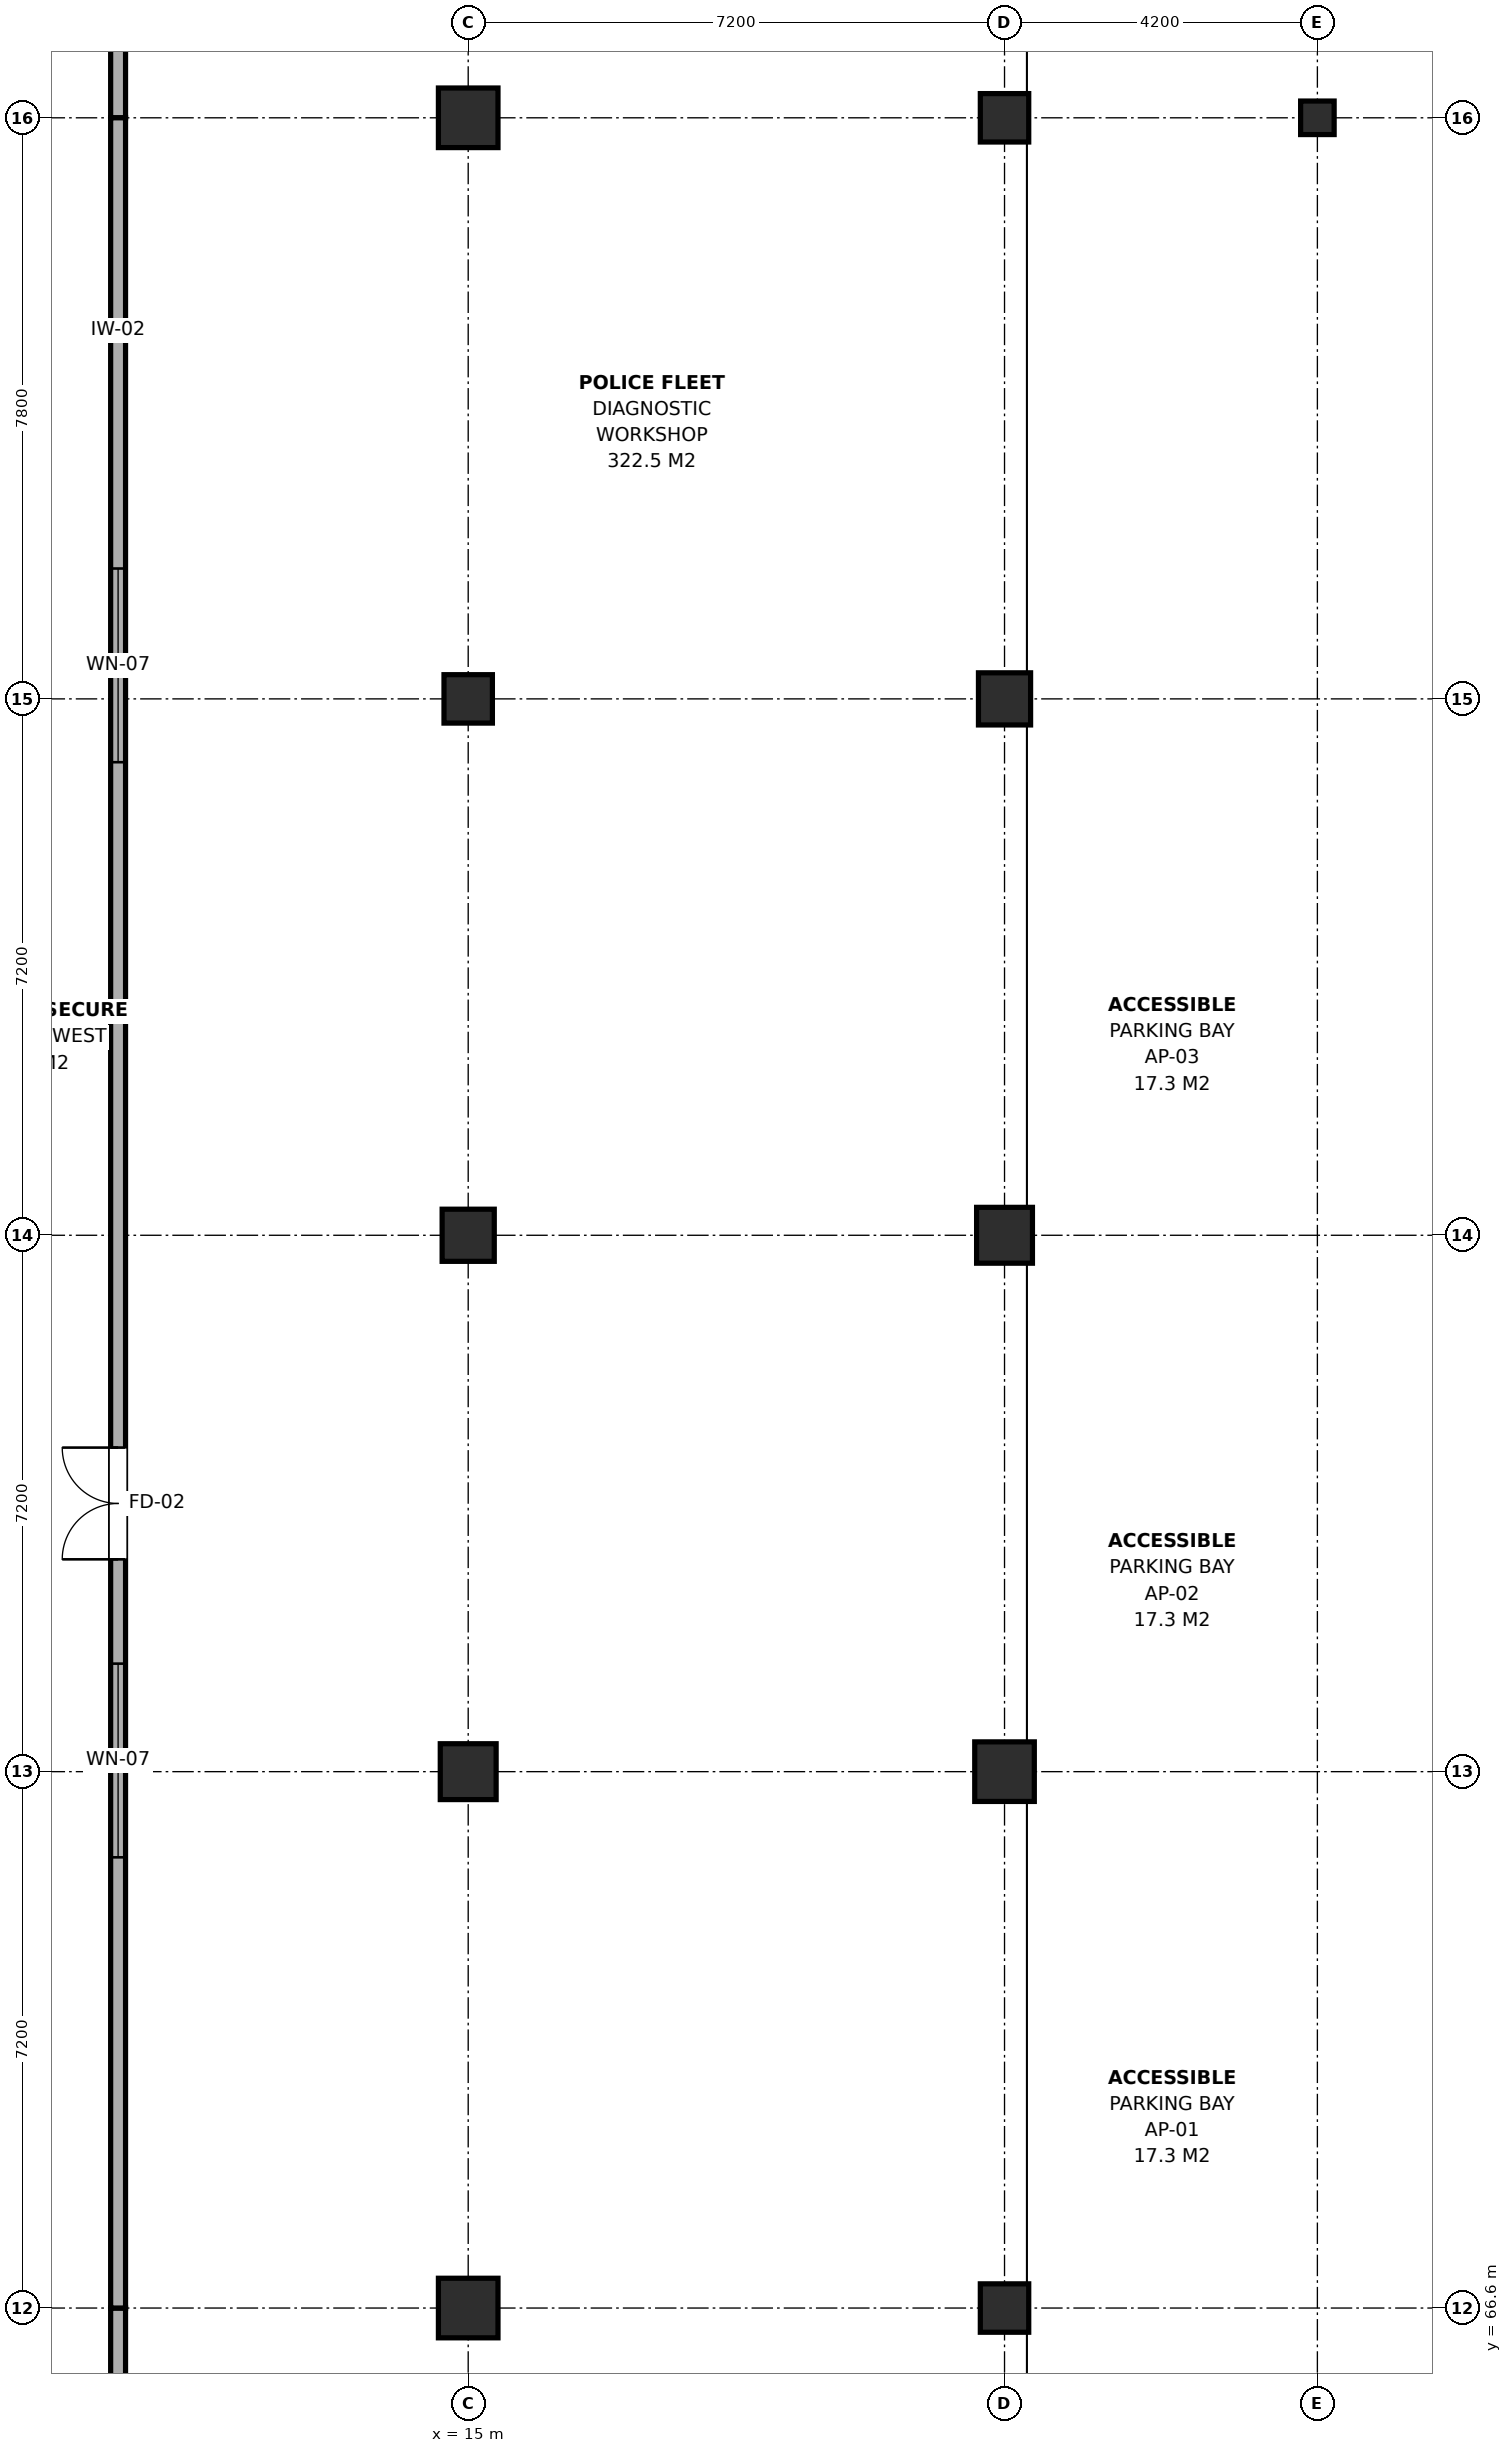
"""IFC4 building model, lengths in metres.
Left out: names, types, materials, properties, quantities, classifications, styles, units other than length and angle.
Written with IfcOpenShell. Run it as: python <this file> out.ifc"""

import sys

from ifc_helpers import new_model, si_unit, direction, frame, frame_2d, origin, origin_2d, place, context, subcontext, project, spatial, rectangle, extrude, element, fill, save


model = new_model("IFC4")
c1 = context("Model", 3, precision=1e-05, world=origin(), true_north=direction((0.0, 1.0)))
c2 = subcontext(c1, "Body", "Model", "MODEL_VIEW")
j1 = project(units=[si_unit("LENGTHUNIT", "METRE"), si_unit("PLANEANGLEUNIT", "RADIAN")], contexts=[c1])
p1 = place(None, origin())
s1 = spatial("IfcSite", under=j1, at=p1, CompositionType="ELEMENT")
p2 = place(p1, origin())
s2 = spatial("IfcBuilding", under=s1, at=p2, CompositionType="ELEMENT")
p3 = place(p2, frame((0.0, 0.0, -4.2)))
s3 = spatial("IfcBuildingStorey", under=s2, at=p3, CompositionType="ELEMENT", Elevation=-4.2)
p4 = place(p3, frame((15.0, 66.6, 0.0), z_axis=(0.0, 0.0, 1.0), x_axis=(1.0, 0.0, 0.0)))
e1 = element("IfcColumn", 1, at=p4, inside=s3, PredefinedType="COLUMN", context=c2, shape_type="SweptSolid", body=[
    extrude(rectangle(XDim=0.8, YDim=0.8, at=origin_2d()), origin(), (0.0, 0.0, 1.0), 4.2),
])
p5 = place(p3, frame((15.0, 73.8, 0.0), z_axis=(0.0, 0.0, 1.0), x_axis=(1.0, 0.0, 0.0)))
e2 = element("IfcColumn", 2, at=p5, inside=s3, PredefinedType="COLUMN", context=c2, shape_type="SweptSolid", body=[
    extrude(rectangle(XDim=0.75, YDim=0.75, at=origin_2d()), origin(), (0.0, 0.0, 1.0), 4.2),
])
p6 = place(p3, frame((15.0, 81.0, 0.0), z_axis=(0.0, 0.0, 1.0), x_axis=(1.0, 0.0, 0.0)))
e3 = element("IfcColumn", 3, at=p6, inside=s3, PredefinedType="COLUMN", context=c2, shape_type="SweptSolid", body=[
    extrude(rectangle(XDim=0.7, YDim=0.7, at=origin_2d()), origin(), (0.0, 0.0, 1.0), 4.2),
])
p7 = place(p3, frame((15.0, 88.2, 0.0), z_axis=(0.0, 0.0, 1.0), x_axis=(1.0, 0.0, 0.0)))
e4 = element("IfcColumn", 4, at=p7, inside=s3, PredefinedType="COLUMN", context=c2, shape_type="SweptSolid", body=[
    extrude(rectangle(XDim=0.65, YDim=0.65, at=origin_2d()), origin(), (0.0, 0.0, 1.0), 4.2),
])
p8 = place(p3, frame((15.0, 96.0, 0.0), z_axis=(0.0, 0.0, 1.0), x_axis=(1.0, 0.0, 0.0)))
e5 = element("IfcColumn", 5, at=p8, inside=s3, PredefinedType="COLUMN", context=c2, shape_type="SweptSolid", body=[
    extrude(rectangle(XDim=0.8, YDim=0.8, at=origin_2d()), origin(), (0.0, 0.0, 1.0), 4.2),
])
p9 = place(p3, frame((22.2, 66.6, 0.0), z_axis=(0.0, 0.0, 1.0), x_axis=(1.0, 0.0, 0.0)))
e6 = element("IfcColumn", 6, at=p9, inside=s3, PredefinedType="COLUMN", context=c2, shape_type="SweptSolid", body=[
    extrude(rectangle(XDim=0.65, YDim=0.65, at=origin_2d()), origin(), (0.0, 0.0, 1.0), 4.2),
])
p10 = place(p3, frame((22.2, 73.8, 0.0), z_axis=(0.0, 0.0, 1.0), x_axis=(1.0, 0.0, 0.0)))
e7 = element("IfcColumn", 7, at=p10, inside=s3, PredefinedType="COLUMN", context=c2, shape_type="SweptSolid", body=[
    extrude(rectangle(XDim=0.8, YDim=0.8, at=origin_2d()), origin(), (0.0, 0.0, 1.0), 4.2),
])
p11 = place(p3, frame((22.2, 81.0, 0.0), z_axis=(0.0, 0.0, 1.0), x_axis=(1.0, 0.0, 0.0)))
e8 = element("IfcColumn", 8, at=p11, inside=s3, PredefinedType="COLUMN", context=c2, shape_type="SweptSolid", body=[
    extrude(rectangle(XDim=0.75, YDim=0.75, at=origin_2d()), origin(), (0.0, 0.0, 1.0), 4.2),
])
p12 = place(p3, frame((22.2, 88.2, 0.0), z_axis=(0.0, 0.0, 1.0), x_axis=(1.0, 0.0, 0.0)))
e9 = element("IfcColumn", 9, at=p12, inside=s3, PredefinedType="COLUMN", context=c2, shape_type="SweptSolid", body=[
    extrude(rectangle(XDim=0.7, YDim=0.7, at=origin_2d()), origin(), (0.0, 0.0, 1.0), 4.2),
])
p13 = place(p3, frame((22.2, 96.0, 0.0), z_axis=(0.0, 0.0, 1.0), x_axis=(1.0, 0.0, 0.0)))
e10 = element("IfcColumn", 10, at=p13, inside=s3, PredefinedType="COLUMN", context=c2, shape_type="SweptSolid", body=[
    extrude(rectangle(XDim=0.65, YDim=0.65, at=origin_2d()), origin(), (0.0, 0.0, 1.0), 4.2),
])
p14 = place(p3, frame((26.4, 96.0, 0.0), z_axis=(0.0, 0.0, 1.0), x_axis=(1.0, 0.0, 0.0)))
e11 = element("IfcColumn", 11, at=p14, inside=s3, PredefinedType="COLUMN", context=c2, shape_type="SweptSolid", body=[
    extrude(rectangle(XDim=0.45, YDim=0.45, at=origin_2d()), origin(), (0.0, 0.0, 1.0), 4.2),
])
p15 = place(p3, frame((10.3, 42.0, 0.0), z_axis=(0.0, 0.0, 1.0), x_axis=(0.0, 1.0, 0.0)))
e12 = element("IfcWall", 12, at=p15, inside=s3, PredefinedType="PARTITIONING", context=c2, shape_type="SweptSolid", body=[
    extrude(rectangle(XDim=24.6, YDim=0.2, at=frame_2d((12.3, 0.0))), origin(), (0.0, 0.0, 1.0), 3.315),
])
p16 = place(p15, frame((7.9, 0.0, 0.0)))
e13 = element("IfcOpeningElement", 13, at=p16, cuts=e12, PredefinedType="OPENING", context=c2, shape_type="SweptSolid", body=[
    extrude(rectangle(XDim=1.0, YDim=2.15, at=frame_2d((0.5, 1.075))), frame((0.0, 0.115, 0.0), z_axis=(0.0, -1.0, 0.0), x_axis=(1.0, 0.0, 0.0)), (0.0, 0.0, 1.0), 0.23),
])
p17 = place(p15, frame((4.85, 0.0, 0.95)))
e14 = element("IfcOpeningElement", 14, at=p17, cuts=e12, PredefinedType="OPENING", context=c2, shape_type="SweptSolid", body=[
    extrude(rectangle(XDim=2.6, YDim=1.5, at=frame_2d((1.3, 0.75))), frame((0.0, 0.115, 0.0), z_axis=(0.0, -1.0, 0.0), x_axis=(1.0, 0.0, 0.0)), (0.0, 0.0, 1.0), 0.23),
])
p18 = place(p15, frame((17.15, 0.0, 0.95)))
e15 = element("IfcOpeningElement", 15, at=p18, cuts=e12, PredefinedType="OPENING", context=c2, shape_type="SweptSolid", body=[
    extrude(rectangle(XDim=2.6, YDim=1.5, at=frame_2d((1.3, 0.75))), frame((0.0, 0.115, 0.0), z_axis=(0.0, -1.0, 0.0), x_axis=(1.0, 0.0, 0.0)), (0.0, 0.0, 1.0), 0.23),
])
p19 = place(p3, frame((10.3, 96.0, 0.0), z_axis=(0.0, 0.0, 1.0), x_axis=(0.0, 1.0, 0.0)))
e16 = element("IfcWall", 16, at=p19, inside=s3, PredefinedType="PARTITIONING", context=c2, shape_type="SweptSolid", body=[
    extrude(rectangle(XDim=26.4, YDim=0.2, at=frame_2d((13.2, 0.0))), origin(), (0.0, 0.0, 1.0), 3.265),
])
p20 = place(p19, frame((12.15, 0.0, 0.0)))
e17 = element("IfcOpeningElement", 17, at=p20, cuts=e16, PredefinedType="OPENING", context=c2, shape_type="SweptSolid", body=[
    extrude(rectangle(XDim=1.5, YDim=2.15, at=frame_2d((0.75, 1.075))), frame((0.0, 0.115, 0.0), z_axis=(0.0, -1.0, 0.0), x_axis=(1.0, 0.0, 0.0)), (0.0, 0.0, 1.0), 0.23),
])
p21 = place(p19, frame((5.3, 0.0, 0.95)))
e18 = element("IfcOpeningElement", 18, at=p21, cuts=e16, PredefinedType="OPENING", context=c2, shape_type="SweptSolid", body=[
    extrude(rectangle(XDim=2.6, YDim=1.5, at=frame_2d((1.3, 0.75))), frame((0.0, 0.115, 0.0), z_axis=(0.0, -1.0, 0.0), x_axis=(1.0, 0.0, 0.0)), (0.0, 0.0, 1.0), 0.23),
])
p22 = place(p19, frame((18.5, 0.0, 0.95)))
e19 = element("IfcOpeningElement", 19, at=p22, cuts=e16, PredefinedType="OPENING", context=c2, shape_type="SweptSolid", body=[
    extrude(rectangle(XDim=2.6, YDim=1.5, at=frame_2d((1.3, 0.75))), frame((0.0, 0.115, 0.0), z_axis=(0.0, -1.0, 0.0), x_axis=(1.0, 0.0, 0.0)), (0.0, 0.0, 1.0), 0.23),
])
p23 = place(p3, frame((10.3, 66.6, 0.0), z_axis=(0.0, 0.0, 1.0), x_axis=(0.0, 1.0, 0.0)))
e20 = element("IfcWall", 20, at=p23, inside=s3, PredefinedType="PARTITIONING", context=c2, shape_type="SweptSolid", body=[
    extrude(rectangle(XDim=29.4, YDim=0.2, at=frame_2d((14.7, 0.0))), origin(), (0.0, 0.0, 1.0), 3.265),
])
p24 = place(p23, frame((10.05, 0.0, 0.0)))
e21 = element("IfcOpeningElement", 21, at=p24, cuts=e20, PredefinedType="OPENING", context=c2, shape_type="SweptSolid", body=[
    extrude(rectangle(XDim=1.5, YDim=2.15, at=frame_2d((0.75, 1.075))), frame((0.0, 0.115, 0.0), z_axis=(0.0, -1.0, 0.0), x_axis=(1.0, 0.0, 0.0)), (0.0, 0.0, 1.0), 0.23),
])
p25 = place(p23, frame((6.05, 0.0, 0.95)))
e22 = element("IfcOpeningElement", 22, at=p25, cuts=e20, PredefinedType="OPENING", context=c2, shape_type="SweptSolid", body=[
    extrude(rectangle(XDim=2.6, YDim=1.5, at=frame_2d((1.3, 0.75))), frame((0.0, 0.115, 0.0), z_axis=(0.0, -1.0, 0.0), x_axis=(1.0, 0.0, 0.0)), (0.0, 0.0, 1.0), 0.23),
])
p26 = place(p23, frame((20.75, 0.0, 0.95)))
e23 = element("IfcOpeningElement", 23, at=p26, cuts=e20, PredefinedType="OPENING", context=c2, shape_type="SweptSolid", body=[
    extrude(rectangle(XDim=2.6, YDim=1.5, at=frame_2d((1.3, 0.75))), frame((0.0, 0.115, 0.0), z_axis=(0.0, -1.0, 0.0), x_axis=(1.0, 0.0, 0.0)), (0.0, 0.0, 1.0), 0.23),
])
p27 = place(p24, origin())
e24 = element("IfcDoor", 24, at=p27, inside=s3, OperationType="DOUBLE_DOOR_SINGLE_SWING", PredefinedType="DOOR", context=c2, shape_type="SweptSolid", body=[
    extrude(rectangle(XDim=1.5, YDim=2.15, at=frame_2d((0.75, 1.075))), frame((0.0, 0.025, 0.0), z_axis=(0.0, -1.0, 0.0), x_axis=(1.0, 0.0, 0.0)), (0.0, 0.0, 1.0), 0.05),
])
fill(e21, e24)
p28 = place(p25, origin())
e25 = element("IfcWindow", 25, at=p28, inside=s3, PartitioningType="SINGLE_PANEL", PredefinedType="WINDOW", context=c2, shape_type="SweptSolid", body=[
    extrude(rectangle(XDim=2.6, YDim=1.5, at=frame_2d((1.3, 0.75))), frame((0.0, 0.03, 0.0), z_axis=(0.0, -1.0, 0.0), x_axis=(1.0, 0.0, 0.0)), (0.0, 0.0, 1.0), 0.06),
])
fill(e22, e25)
p29 = place(p26, origin())
e26 = element("IfcWindow", 26, at=p29, inside=s3, PartitioningType="SINGLE_PANEL", PredefinedType="WINDOW", context=c2, shape_type="SweptSolid", body=[
    extrude(rectangle(XDim=2.6, YDim=1.5, at=frame_2d((1.3, 0.75))), frame((0.0, 0.03, 0.0), z_axis=(0.0, -1.0, 0.0), x_axis=(1.0, 0.0, 0.0)), (0.0, 0.0, 1.0), 0.06),
])
fill(e23, e26)
save(model, sys.argv[1])
